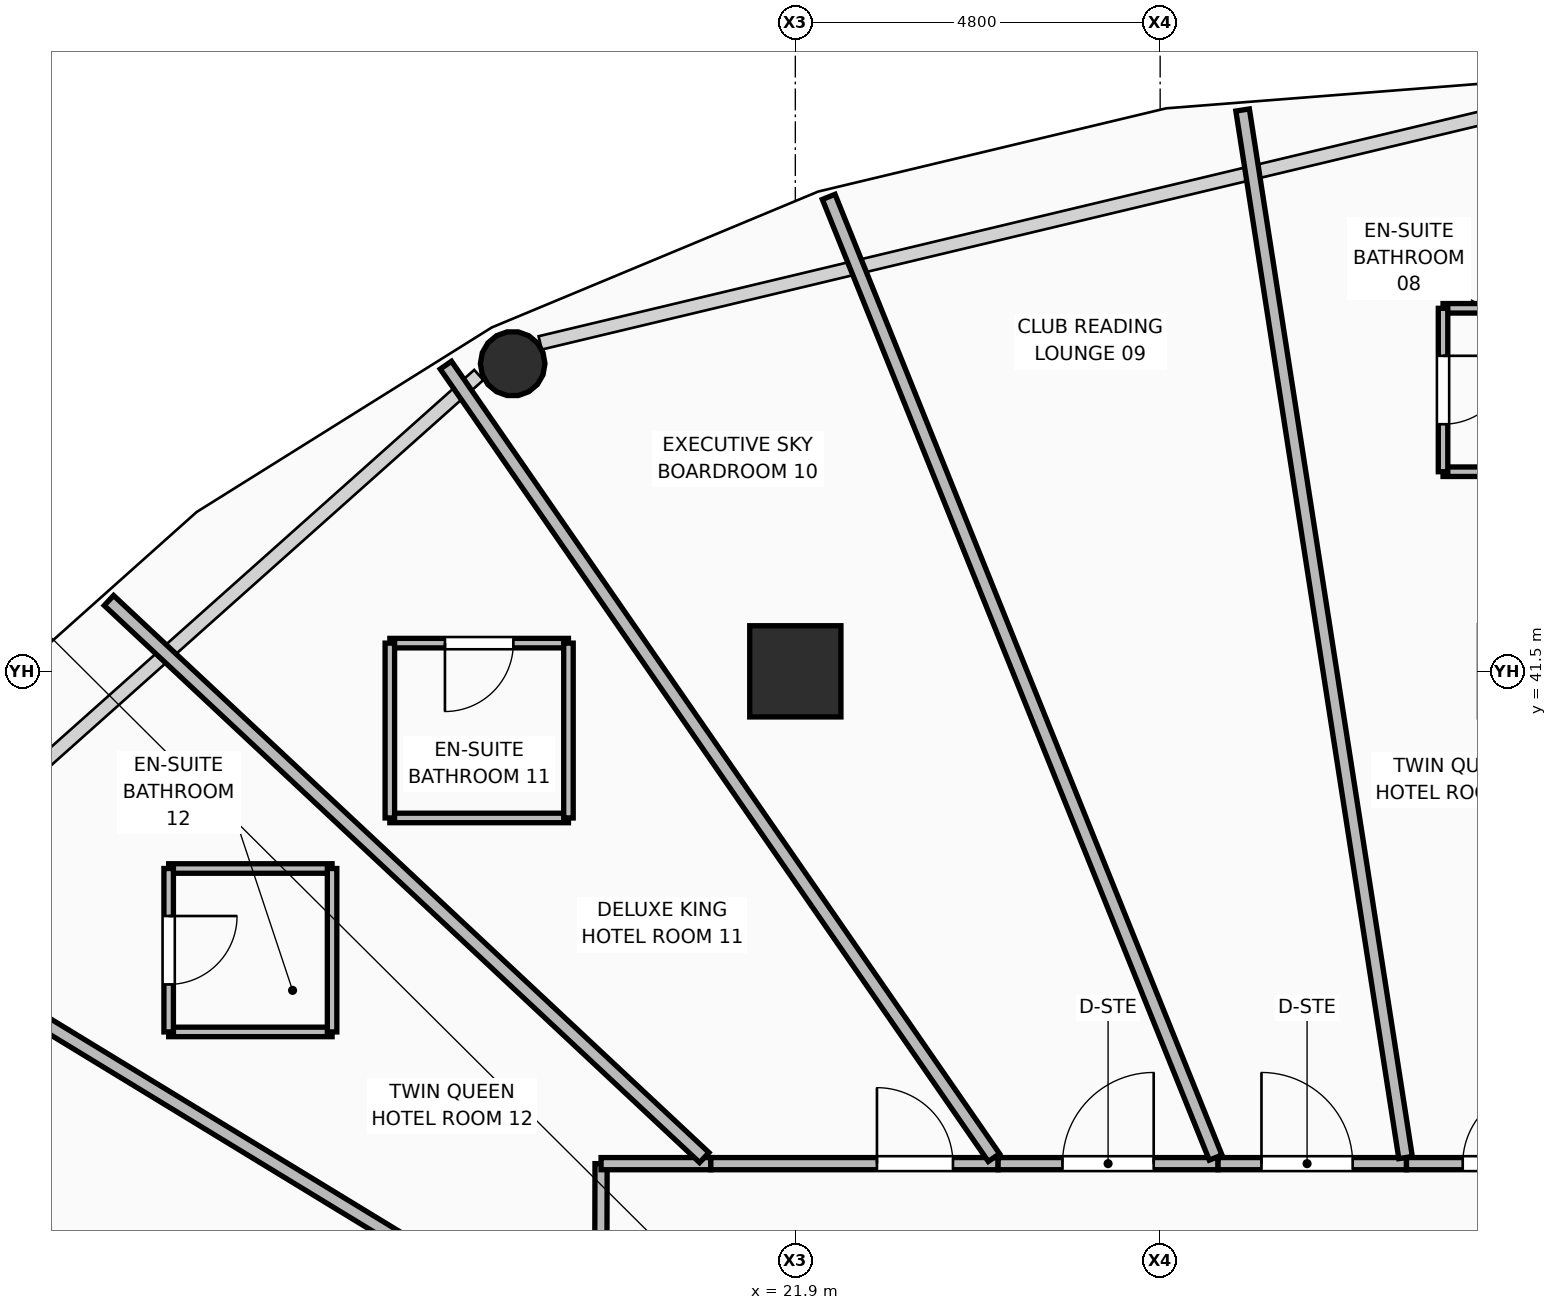
"""IFC4 building model, lengths in metres.
Left out: names, types, materials, properties, quantities, classifications, styles, units other than length and angle.
Written with IfcOpenShell. Run it as: python <this file> out.ifc"""

import sys

from ifc_helpers import new_model, si_unit, direction, frame, frame_2d, origin, origin_2d, place, context, subcontext, project, spatial, rectangle, hollow_rectangle, hollow_circle, extrude, element, fill, save


model = new_model("IFC4")
c1 = context("Model", 3, precision=1e-05, world=origin(), true_north=direction((0.0, 1.0)))
c2 = subcontext(c1, "Body", "Model", "MODEL_VIEW")
j1 = project(units=[si_unit("LENGTHUNIT", "METRE"), si_unit("PLANEANGLEUNIT", "RADIAN")], contexts=[c1])
p1 = place(None, origin())
s1 = spatial("IfcSite", under=j1, at=p1, CompositionType="ELEMENT")
p2 = place(p1, origin())
s2 = spatial("IfcBuilding", under=s1, at=p2, CompositionType="ELEMENT")
p3 = place(p2, frame((0.0, 0.0, 53.25)))
s3 = spatial("IfcBuildingStorey", under=s2, at=p3, CompositionType="ELEMENT", Elevation=53.25)
p4 = place(p3, frame((21.9, 41.5, 0.0), z_axis=(0.0, 0.0, 1.0), x_axis=(1.0, 0.0, 0.0)))
e1 = element("IfcColumn", 1, at=p4, inside=s3, PredefinedType="COLUMN", context=c2, shape_type="SweptSolid", body=[
    extrude(hollow_rectangle(XDim=1.2, YDim=1.2, WallThickness=0.045, at=origin_2d()), origin(), (0.0, 0.0, 1.0), 3.75),
])
p5 = place(p3, frame((18.181, 45.547, 0.0), z_axis=(-0.111309599924, 0.172151708361, 0.978761442985), x_axis=(-0.839754063035, -0.542966954443, 0.0)))
e2 = element("IfcColumn", 2, at=p5, inside=s3, PredefinedType="COLUMN", context=c2, shape_type="SweptSolid", body=[
    extrude(hollow_circle(Radius=0.425, WallThickness=0.04, at=origin_2d()), origin(), (0.0, 0.0, 1.0), 3.647),
])
p6 = place(p3, frame((19.338, 32.412, 0.0), z_axis=(0.0, 0.0, 1.0), x_axis=(0.002337753103, 0.999997267451, 0.0)))
e3 = element("IfcWall", 3, at=p6, inside=s3, PredefinedType="PARTITIONING", context=c2, shape_type="SweptSolid", body=[
    extrude(rectangle(XDim=2.611, YDim=0.16, at=frame_2d((1.305, 0.0))), origin(), (0.0, 0.0, 1.0), 2.928),
])
p7 = place(p6, frame((0.59, 0.0, 0.0)))
e4 = element("IfcOpeningElement", 4, at=p7, cuts=e3, PredefinedType="OPENING", context=c2, shape_type="SweptSolid", body=[
    extrude(rectangle(XDim=1.0, YDim=2.1, at=frame_2d((0.5, 1.05))), frame((0.0, 0.09, 0.0), z_axis=(0.0, -1.0, 0.0), x_axis=(1.0, 0.0, 0.0)), (0.0, 0.0, 1.0), 0.18),
])
p8 = place(p3, frame((19.344, 35.023, 0.0), z_axis=(0.0, 0.0, 1.0), x_axis=(1.0, 0.0, 0.0)))
e5 = element("IfcWall", 5, at=p8, inside=s3, PredefinedType="PARTITIONING", context=c2, shape_type="SweptSolid", body=[
    extrude(rectangle(XDim=1.444, YDim=0.16, at=frame_2d((0.722, 0.0))), origin(), (0.0, 0.0, 1.0), 3.55),
])
p9 = place(p3, frame((20.788, 35.023, 0.0), z_axis=(0.0, 0.0, 1.0), x_axis=(1.0, 0.0, 0.0)))
e6 = element("IfcWall", 6, at=p9, inside=s3, PredefinedType="PARTITIONING", context=c2, shape_type="SweptSolid", body=[
    extrude(rectangle(XDim=3.78, YDim=0.16, at=frame_2d((1.89, 0.0))), origin(), (0.0, 0.0, 1.0), 2.928),
])
p10 = place(p9, frame((2.186, 0.0, 0.0)))
e7 = element("IfcOpeningElement", 7, at=p10, cuts=e6, PredefinedType="OPENING", context=c2, shape_type="SweptSolid", body=[
    extrude(rectangle(XDim=1.0, YDim=2.1, at=frame_2d((0.5, 1.05))), frame((0.0, 0.09, 0.0), z_axis=(0.0, -1.0, 0.0), x_axis=(1.0, 0.0, 0.0)), (0.0, 0.0, 1.0), 0.18),
])
p11 = place(p3, frame((24.568, 35.023, 0.0), z_axis=(0.0, 0.0, 1.0), x_axis=(1.0, 0.0, 0.0)))
e8 = element("IfcWall", 8, at=p11, inside=s3, PredefinedType="PARTITIONING", context=c2, shape_type="SweptSolid", body=[
    extrude(rectangle(XDim=2.894, YDim=0.16, at=frame_2d((1.447, 0.0))), origin(), (0.0, 0.0, 1.0), 3.55),
])
p12 = place(p11, frame((0.847, 0.0, 0.0)))
e9 = element("IfcOpeningElement", 9, at=p12, cuts=e8, PredefinedType="OPENING", context=c2, shape_type="SweptSolid", body=[
    extrude(rectangle(XDim=1.2, YDim=2.1, at=frame_2d((0.6, 1.05))), frame((0.0, 0.09, 0.0), z_axis=(0.0, -1.0, 0.0), x_axis=(1.0, 0.0, 0.0)), (0.0, 0.0, 1.0), 0.18),
])
p13 = place(p3, frame((27.462, 35.023, 0.0), z_axis=(0.0, 0.0, 1.0), x_axis=(1.0, 0.0, 0.0)))
e10 = element("IfcWall", 10, at=p13, inside=s3, PredefinedType="PARTITIONING", context=c2, shape_type="SweptSolid", body=[
    extrude(rectangle(XDim=2.479, YDim=0.16, at=frame_2d((1.24, 0.0))), origin(), (0.0, 0.0, 1.0), 3.55),
])
p14 = place(p13, frame((0.571, 0.0, 0.0)))
e11 = element("IfcOpeningElement", 11, at=p14, cuts=e10, PredefinedType="OPENING", context=c2, shape_type="SweptSolid", body=[
    extrude(rectangle(XDim=1.2, YDim=2.1, at=frame_2d((0.6, 1.05))), frame((0.0, 0.09, 0.0), z_axis=(0.0, -1.0, 0.0), x_axis=(1.0, 0.0, 0.0)), (0.0, 0.0, 1.0), 0.18),
])
p15 = place(p3, frame((29.941, 35.023, 0.0), z_axis=(0.0, 0.0, 1.0), x_axis=(1.0, 0.0, 0.0)))
e12 = element("IfcWall", 12, at=p15, inside=s3, PredefinedType="PARTITIONING", context=c2, shape_type="SweptSolid", body=[
    extrude(rectangle(XDim=2.335, YDim=0.16, at=frame_2d((1.167, 0.0))), origin(), (0.0, 0.0, 1.0), 2.928),
])
p16 = place(p15, frame((0.74, 0.0, 0.0)))
e13 = element("IfcOpeningElement", 13, at=p16, cuts=e12, PredefinedType="OPENING", context=c2, shape_type="SweptSolid", body=[
    extrude(rectangle(XDim=1.0, YDim=2.1, at=frame_2d((0.5, 1.05))), frame((0.0, 0.09, 0.0), z_axis=(0.0, -1.0, 0.0), x_axis=(1.0, 0.0, 0.0)), (0.0, 0.0, 1.0), 0.18),
])
p17 = place(p3, frame((29.929, 35.103, 0.0), z_axis=(0.0, 0.0, 1.0), x_axis=(-0.153719539221, 0.988114519305, 0.0)))
e14 = element("IfcWall", 14, at=p17, inside=s3, PredefinedType="PARTITIONING", context=c2, shape_type="SweptSolid", body=[
    extrude(rectangle(XDim=13.948, YDim=0.18, at=frame_2d((6.974, 0.0))), origin(), (0.0, 0.0, 1.0), 2.775),
])
p18 = place(p3, frame((27.43, 35.103, 0.0), z_axis=(0.0, 0.0, 1.0), x_axis=(-0.373620050468, 0.927581833526, 0.0)))
e15 = element("IfcWall", 15, at=p18, inside=s3, PredefinedType="PARTITIONING", context=c2, shape_type="SweptSolid", body=[
    extrude(rectangle(XDim=13.626, YDim=0.18, at=frame_2d((6.813, 0.0))), origin(), (0.0, 0.0, 1.0), 2.775),
])
p19 = place(p3, frame((24.513, 35.103, 0.0), z_axis=(0.0, 0.0, 1.0), x_axis=(-0.568868408374, 0.822428558572, 0.0)))
e16 = element("IfcWall", 16, at=p19, inside=s3, PredefinedType="PARTITIONING", context=c2, shape_type="SweptSolid", body=[
    extrude(rectangle(XDim=12.676, YDim=0.18, at=frame_2d((6.338, 0.0))), origin(), (0.0, 0.0, 1.0), 2.775),
])
p20 = place(p3, frame((20.702, 35.103, 0.0), z_axis=(0.0, 0.0, 1.0), x_axis=(-0.730215371194, 0.683217031164, 0.0)))
e17 = element("IfcWall", 17, at=p20, inside=s3, PredefinedType="PARTITIONING", context=c2, shape_type="SweptSolid", body=[
    extrude(rectangle(XDim=10.727, YDim=0.18, at=frame_2d((5.364, 0.0))), origin(), (0.0, 0.0, 1.0), 2.775),
])
p21 = place(p3, frame((19.248, 32.467, 0.0), z_axis=(0.0, 0.0, 1.0), x_axis=(-0.853919589257, 0.520404972192, 0.0)))
e18 = element("IfcWall", 18, at=p21, inside=s3, PredefinedType="PARTITIONING", context=c2, shape_type="SweptSolid", body=[
    extrude(rectangle(XDim=11.75, YDim=0.18, at=frame_2d((5.875, 0.0))), origin(), (0.0, 0.0, 1.0), 2.775),
])
p22 = place(p3, frame((19.248, 29.473, 0.0), z_axis=(0.0, 0.0, 1.0), x_axis=(-0.939376353179, 0.34288783456, 0.0)))
e19 = element("IfcWall", 19, at=p22, inside=s3, PredefinedType="PARTITIONING", context=c2, shape_type="SweptSolid", body=[
    extrude(rectangle(XDim=13.576, YDim=0.18, at=frame_2d((6.788, 0.0))), origin(), (0.0, 0.0, 1.0), 2.775),
])
for number, where, z_axis, x_axis in (
    (20, (30.422, 44.126, 0.0), (0.0, 0.0, 1.0), (1.0, 0.0, 0.0)),
    (21, (30.422, 46.276, 0.0), (0.0, 0.0, 1.0), (1.0, 0.0, 0.0)),
):
    element("IfcWall", number, at=place(p3, frame(where, z_axis=z_axis, x_axis=x_axis)), inside=s3, PredefinedType="PARTITIONING", context=c2, shape_type="SweptSolid", body=[
        extrude(rectangle(XDim=2.15, YDim=0.125, at=frame_2d((1.075, 0.0))), origin(), (0.0, 0.0, 1.0), 2.928),
    ])
p23 = place(p3, frame((30.422, 44.126, 0.0), z_axis=(0.0, 0.0, 1.0), x_axis=(0.0, 1.0, 0.0)))
e22 = element("IfcWall", 22, at=p23, inside=s3, PredefinedType="PARTITIONING", context=c2, shape_type="SweptSolid", body=[
    extrude(rectangle(XDim=2.15, YDim=0.125, at=frame_2d((1.075, 0.0))), origin(), (0.0, 0.0, 1.0), 3.55),
])
p24 = place(p23, frame((0.625, 0.0, 0.0)))
e23 = element("IfcOpeningElement", 23, at=p24, cuts=e22, PredefinedType="OPENING", context=c2, shape_type="SweptSolid", body=[
    extrude(rectangle(XDim=0.9, YDim=2.1, at=frame_2d((0.45, 1.05))), frame((0.0, 0.073, 0.0), z_axis=(0.0, -1.0, 0.0), x_axis=(1.0, 0.0, 0.0)), (0.0, 0.0, 1.0), 0.145),
])
p25 = place(p3, frame((16.565, 39.571, 0.0), z_axis=(0.0, 0.0, 1.0), x_axis=(1.0, 0.0, 0.0)))
e24 = element("IfcWall", 24, at=p25, inside=s3, PredefinedType="PARTITIONING", context=c2, shape_type="SweptSolid", body=[
    extrude(rectangle(XDim=2.35, YDim=0.125, at=frame_2d((1.175, 0.0))), origin(), (0.0, 0.0, 1.0), 3.55),
])
p26 = place(p3, frame((16.565, 41.871, 0.0), z_axis=(0.0, 0.0, 1.0), x_axis=(1.0, 0.0, 0.0)))
e25 = element("IfcWall", 25, at=p26, inside=s3, PredefinedType="PARTITIONING", context=c2, shape_type="SweptSolid", body=[
    extrude(rectangle(XDim=2.35, YDim=0.125, at=frame_2d((1.175, 0.0))), origin(), (0.0, 0.0, 1.0), 2.928),
])
p27 = place(p26, frame((0.725, 0.0, 0.0)))
e26 = element("IfcOpeningElement", 26, at=p27, cuts=e25, PredefinedType="OPENING", context=c2, shape_type="SweptSolid", body=[
    extrude(rectangle(XDim=0.9, YDim=2.1, at=frame_2d((0.45, 1.05))), frame((0.0, 0.073, 0.0), z_axis=(0.0, -1.0, 0.0), x_axis=(1.0, 0.0, 0.0)), (0.0, 0.0, 1.0), 0.145),
])
p28 = place(p3, frame((16.565, 39.571, 0.0), z_axis=(0.0, 0.0, 1.0), x_axis=(0.0, 1.0, 0.0)))
e27 = element("IfcWall", 27, at=p28, inside=s3, PredefinedType="PARTITIONING", context=c2, shape_type="SweptSolid", body=[
    extrude(rectangle(XDim=2.3, YDim=0.125, at=frame_2d((1.15, 0.0))), origin(), (0.0, 0.0, 1.0), 3.55),
])
p29 = place(p3, frame((18.915, 39.571, 0.0), z_axis=(0.0, 0.0, 1.0), x_axis=(0.0, 1.0, 0.0)))
e28 = element("IfcWall", 28, at=p29, inside=s3, PredefinedType="PARTITIONING", context=c2, shape_type="SweptSolid", body=[
    extrude(rectangle(XDim=2.3, YDim=0.125, at=frame_2d((1.15, 0.0))), origin(), (0.0, 0.0, 1.0), 2.928),
])
for number, where, z_axis, x_axis in (
    (29, (13.655, 36.756, 0.0), (0.0, 0.0, 1.0), (1.0, 0.0, 0.0)),
    (30, (13.655, 38.906, 0.0), (0.0, 0.0, 1.0), (1.0, 0.0, 0.0)),
):
    element("IfcWall", number, at=place(p3, frame(where, z_axis=z_axis, x_axis=x_axis)), inside=s3, PredefinedType="PARTITIONING", context=c2, shape_type="SweptSolid", body=[
        extrude(rectangle(XDim=2.15, YDim=0.125, at=frame_2d((1.075, 0.0))), origin(), (0.0, 0.0, 1.0), 3.55),
    ])
p30 = place(p3, frame((13.655, 36.756, 0.0), z_axis=(0.0, 0.0, 1.0), x_axis=(0.0, 1.0, 0.0)))
e31 = element("IfcWall", 31, at=p30, inside=s3, PredefinedType="PARTITIONING", context=c2, shape_type="SweptSolid", body=[
    extrude(rectangle(XDim=2.15, YDim=0.125, at=frame_2d((1.075, 0.0))), origin(), (0.0, 0.0, 1.0), 3.55),
])
p31 = place(p30, frame((0.625, 0.0, 0.0)))
e32 = element("IfcOpeningElement", 32, at=p31, cuts=e31, PredefinedType="OPENING", context=c2, shape_type="SweptSolid", body=[
    extrude(rectangle(XDim=0.9, YDim=2.1, at=frame_2d((0.45, 1.05))), frame((0.0, 0.073, 0.0), z_axis=(0.0, -1.0, 0.0), x_axis=(1.0, 0.0, 0.0)), (0.0, 0.0, 1.0), 0.145),
])
p32 = place(p3, frame((15.805, 36.756, 0.0), z_axis=(0.0, 0.0, 1.0), x_axis=(0.0, 1.0, 0.0)))
e33 = element("IfcWall", 33, at=p32, inside=s3, PredefinedType="PARTITIONING", context=c2, shape_type="SweptSolid", body=[
    extrude(rectangle(XDim=2.15, YDim=0.125, at=frame_2d((1.075, 0.0))), origin(), (0.0, 0.0, 1.0), 3.55),
])
p33 = place(p24, frame((0.9, 0.0, 0.0), z_axis=(0.0, 0.0, 1.0), x_axis=(-1.0, 0.0, 0.0)))
e34 = element("IfcDoor", 34, at=p33, inside=s3, OperationType="SINGLE_SWING_LEFT", PredefinedType="DOOR", context=c2, shape_type="SweptSolid", body=[
    extrude(rectangle(XDim=0.9, YDim=2.1, at=frame_2d((0.45, 1.05))), frame((0.0, 0.025, 0.0), z_axis=(0.0, -1.0, 0.0), x_axis=(1.0, 0.0, 0.0)), (0.0, 0.0, 1.0), 0.05),
])
fill(e23, e34)
p34 = place(p16, origin())
e35 = element("IfcDoor", 35, at=p34, inside=s3, OperationType="SINGLE_SWING_RIGHT", PredefinedType="DOOR", context=c2, shape_type="SweptSolid", body=[
    extrude(rectangle(XDim=1.0, YDim=2.1, at=frame_2d((0.5, 1.05))), frame((0.0, 0.025, 0.0), z_axis=(0.0, -1.0, 0.0), x_axis=(1.0, 0.0, 0.0)), (0.0, 0.0, 1.0), 0.05),
])
fill(e13, e35)
p35 = place(p14, origin())
e36 = element("IfcDoor", 36, at=p35, inside=s3, OperationType="SINGLE_SWING_LEFT", PredefinedType="DOOR", context=c2, shape_type="SweptSolid", body=[
    extrude(rectangle(XDim=1.2, YDim=2.1, at=frame_2d((0.6, 1.05))), frame((0.0, 0.025, 0.0), z_axis=(0.0, -1.0, 0.0), x_axis=(1.0, 0.0, 0.0)), (0.0, 0.0, 1.0), 0.05),
])
fill(e11, e36)
p36 = place(p12, origin())
e37 = element("IfcDoor", 37, at=p36, inside=s3, OperationType="SINGLE_SWING_RIGHT", PredefinedType="DOOR", context=c2, shape_type="SweptSolid", body=[
    extrude(rectangle(XDim=1.2, YDim=2.1, at=frame_2d((0.6, 1.05))), frame((0.0, 0.025, 0.0), z_axis=(0.0, -1.0, 0.0), x_axis=(1.0, 0.0, 0.0)), (0.0, 0.0, 1.0), 0.05),
])
fill(e9, e37)
p37 = place(p27, frame((0.9, 0.0, 0.0), z_axis=(0.0, 0.0, 1.0), x_axis=(-1.0, 0.0, 0.0)))
e38 = element("IfcDoor", 38, at=p37, inside=s3, OperationType="SINGLE_SWING_RIGHT", PredefinedType="DOOR", context=c2, shape_type="SweptSolid", body=[
    extrude(rectangle(XDim=0.9, YDim=2.1, at=frame_2d((0.45, 1.05))), frame((0.0, 0.025, 0.0), z_axis=(0.0, -1.0, 0.0), x_axis=(1.0, 0.0, 0.0)), (0.0, 0.0, 1.0), 0.05),
])
fill(e26, e38)
p38 = place(p10, origin())
e39 = element("IfcDoor", 39, at=p38, inside=s3, OperationType="SINGLE_SWING_LEFT", PredefinedType="DOOR", context=c2, shape_type="SweptSolid", body=[
    extrude(rectangle(XDim=1.0, YDim=2.1, at=frame_2d((0.5, 1.05))), frame((0.0, 0.025, 0.0), z_axis=(0.0, -1.0, 0.0), x_axis=(1.0, 0.0, 0.0)), (0.0, 0.0, 1.0), 0.05),
])
fill(e7, e39)
p39 = place(p31, frame((0.9, 0.0, 0.0), z_axis=(0.0, 0.0, 1.0), x_axis=(-1.0, 0.0, 0.0)))
e40 = element("IfcDoor", 40, at=p39, inside=s3, OperationType="SINGLE_SWING_LEFT", PredefinedType="DOOR", context=c2, shape_type="SweptSolid", body=[
    extrude(rectangle(XDim=0.9, YDim=2.1, at=frame_2d((0.45, 1.05))), frame((0.0, 0.025, 0.0), z_axis=(0.0, -1.0, 0.0), x_axis=(1.0, 0.0, 0.0)), (0.0, 0.0, 1.0), 0.05),
])
fill(e32, e40)
save(model, sys.argv[1])
